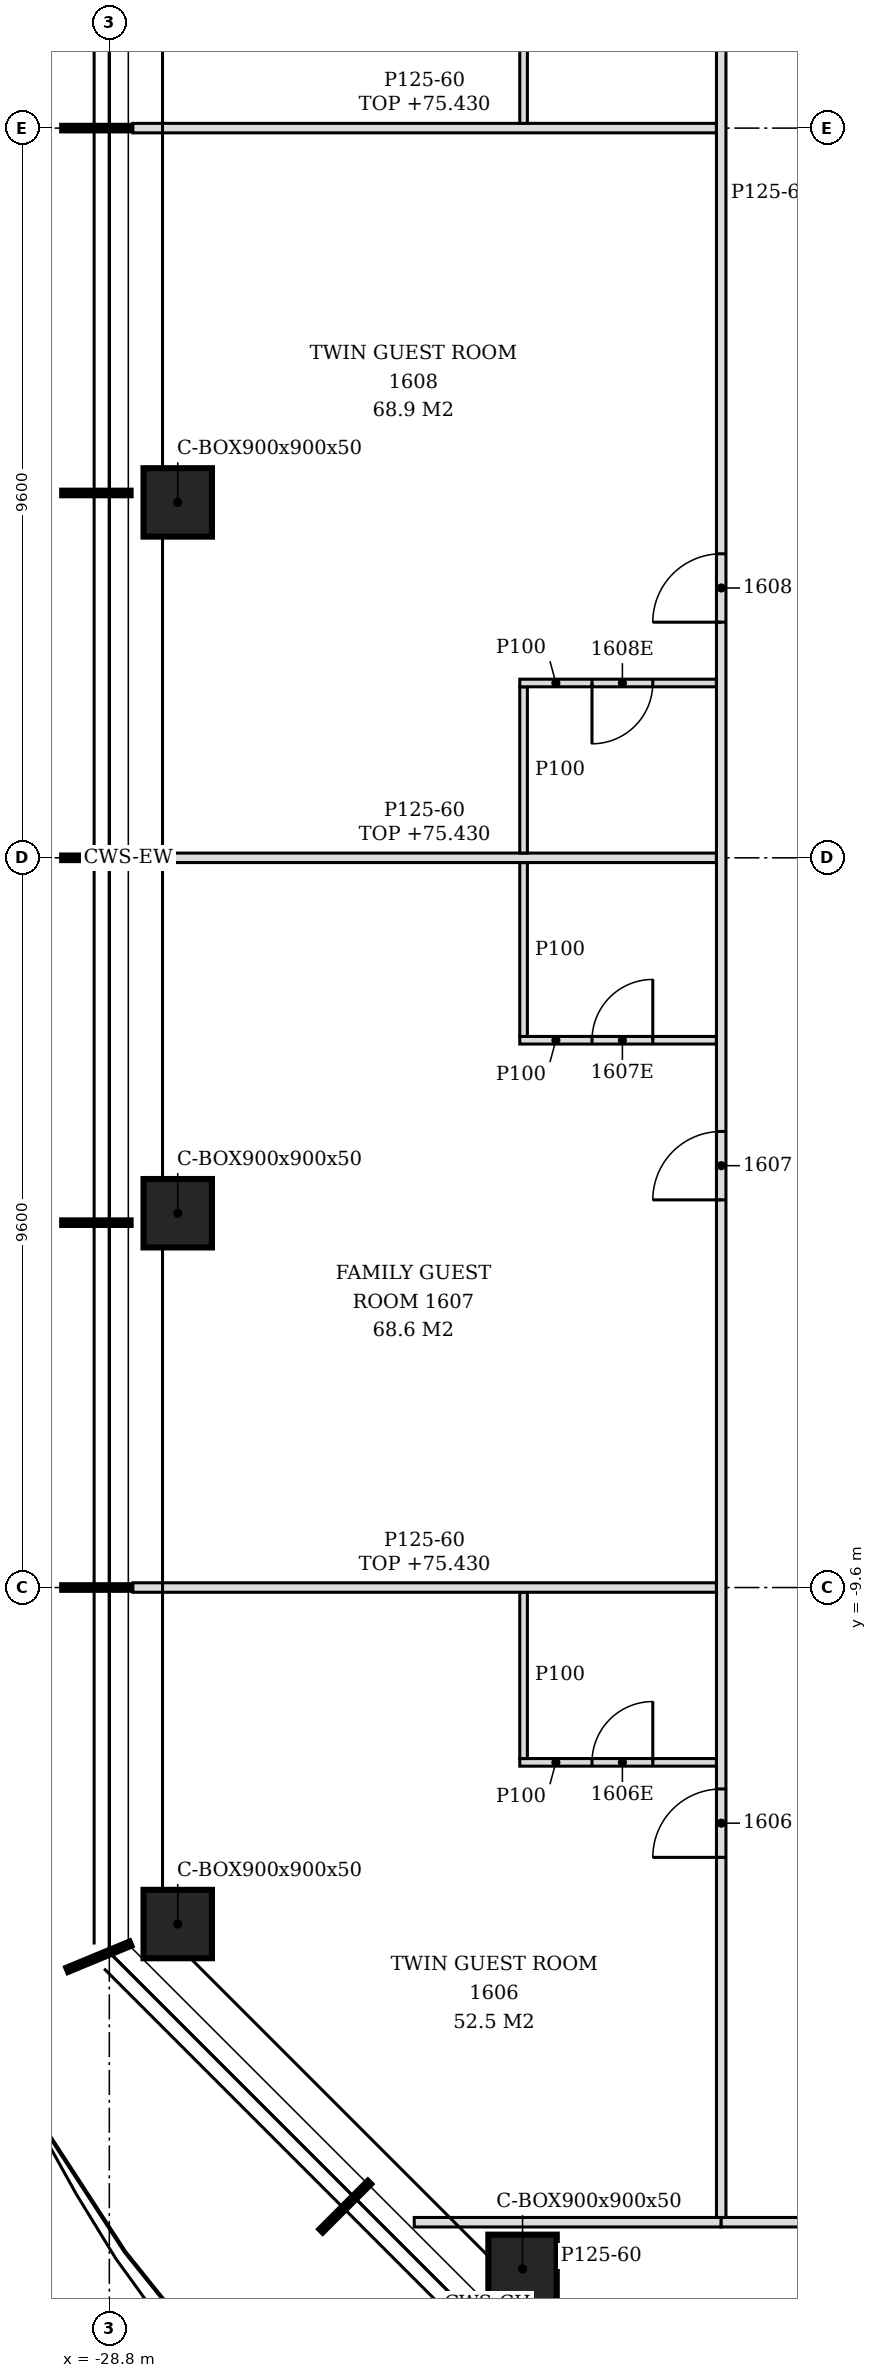
"""IFC4 building model, lengths in metres.
Left out: names, types, materials, properties, quantities, classifications, styles, units other than length and angle.
Written with IfcOpenShell. Run it as: python <this file> out.ifc"""

import sys

from ifc_helpers import new_model, si_unit, direction, frame, frame_2d, origin, origin_2d, place, context, subcontext, project, spatial, polyline, rectangle, hollow_rectangle, outline, extrude, element, fill, save


model = new_model("IFC4")
c1 = context("Model", 3, precision=1e-05, world=origin(), true_north=direction((0.0, 1.0)))
c2 = subcontext(c1, "Body", "Model", "MODEL_VIEW")
j1 = project(units=[si_unit("LENGTHUNIT", "METRE"), si_unit("PLANEANGLEUNIT", "RADIAN")], contexts=[c1])
p1 = place(None, origin())
s1 = spatial("IfcSite", under=j1, at=p1, CompositionType="ELEMENT")
p2 = place(p1, origin())
s2 = spatial("IfcBuilding", under=s1, at=p2, CompositionType="ELEMENT")
p3 = place(p2, frame((0.0, 0.0, 72.6)))
s3 = spatial("IfcBuildingStorey", under=s2, at=p3, CompositionType="ELEMENT", Elevation=72.6)
for number, where, z_axis, x_axis in (
    (1, (-27.9, 4.676, -0.15), (0.0, 0.0, 1.0), (1.0, 0.0, 0.0)),
    (2, (-27.9, -4.676, -0.15), (0.0, 0.0, 1.0), (1.0, 0.0, 0.0)),
    (3, (-27.9, -14.027, -0.15), (0.0, 0.0, 1.0), (1.0, 0.0, 0.0)),
    (4, (-23.364, -18.564, -0.15), (0.0, 0.0, 1.0), (1.0, 0.0, 0.0)),
):
    element("IfcColumn", number, at=place(p3, frame(where, z_axis=z_axis, x_axis=x_axis)), inside=s3, PredefinedType="COLUMN", context=c2, shape_type="SweptSolid", body=[
        extrude(hollow_rectangle(XDim=0.9, YDim=0.9, WallThickness=0.05, at=origin_2d()), origin(), (0.0, 0.0, 1.0), 3.6),
    ])
p4 = place(p3, frame((-24.789, -17.95, 0.0), z_axis=(0.0, 0.0, 1.0), x_axis=(1.0, 0.0, 0.0)))
e5 = element("IfcWall", 5, at=p4, inside=s3, PredefinedType="PARTITIONING", context=c2, shape_type="SweptSolid", body=[
    extrude(outline(polyline([(0.0, 0.0), (4.039, 0.0), (4.039, 3.45), (1.086, 3.45), (1.084, 2.93), (0.537, 2.93), (0.535, 3.45), (0.0, 3.45), (0.0, 0.0)])), frame((0.0, 0.062, 0.0), z_axis=(0.0, -1.0, 0.0), x_axis=(1.0, 0.0, 0.0)), (0.0, 0.0, 1.0), 0.125),
])
p5 = place(p3, frame((-20.75, -17.95, 0.0), z_axis=(0.0, 0.0, 1.0), x_axis=(1.0, 0.0, 0.0)))
e6 = element("IfcWall", 6, at=p5, inside=s3, PredefinedType="PARTITIONING", context=c2, shape_type="SweptSolid", body=[
    extrude(outline(polyline([(0.0, 0.0), (39.887, 0.0), (39.887, 2.73), (39.8, 2.73), (39.798, 3.45), (28.1, 3.45), (28.098, 2.73), (27.8, 2.73), (27.798, 3.45), (16.1, 3.45), (16.098, 2.73), (15.8, 2.73), (15.798, 3.45), (6.5, 3.45), (6.498, 2.93), (6.2, 2.93), (6.198, 3.45), (0.0, 3.45), (0.0, 0.0)])), frame((0.0, 0.062, 0.0), z_axis=(0.0, -1.0, 0.0), x_axis=(1.0, 0.0, 0.0)), (0.0, 0.0, 1.0), 0.125),
])
p6 = place(p5, frame((5.15, 0.0, 0.0)))
e7 = element("IfcOpeningElement", 7, at=p6, cuts=e6, PredefinedType="OPENING", context=c2, shape_type="SweptSolid", body=[
    extrude(rectangle(XDim=0.9, YDim=2.1, at=frame_2d((0.45, 1.05))), frame((0.0, 0.073, 0.0), z_axis=(0.0, -1.0, 0.0), x_axis=(1.0, 0.0, 0.0)), (0.0, 0.0, 1.0), 0.145),
])
p7 = place(p5, frame((14.75, 0.0, 0.0)))
e8 = element("IfcOpeningElement", 8, at=p7, cuts=e6, PredefinedType="OPENING", context=c2, shape_type="SweptSolid", body=[
    extrude(rectangle(XDim=0.9, YDim=2.1, at=frame_2d((0.45, 1.05))), frame((0.0, 0.073, 0.0), z_axis=(0.0, -1.0, 0.0), x_axis=(1.0, 0.0, 0.0)), (0.0, 0.0, 1.0), 0.145),
])
p8 = place(p5, frame((24.35, 0.0, 0.0)))
e9 = element("IfcOpeningElement", 9, at=p8, cuts=e6, PredefinedType="OPENING", context=c2, shape_type="SweptSolid", body=[
    extrude(rectangle(XDim=0.9, YDim=2.1, at=frame_2d((0.45, 1.05))), frame((0.0, 0.073, 0.0), z_axis=(0.0, -1.0, 0.0), x_axis=(1.0, 0.0, 0.0)), (0.0, 0.0, 1.0), 0.145),
])
p9 = place(p5, frame((29.75, 0.0, 0.0)))
e10 = element("IfcOpeningElement", 10, at=p9, cuts=e6, PredefinedType="OPENING", context=c2, shape_type="SweptSolid", body=[
    extrude(rectangle(XDim=0.9, YDim=2.1, at=frame_2d((0.45, 1.05))), frame((0.0, 0.073, 0.0), z_axis=(0.0, -1.0, 0.0), x_axis=(1.0, 0.0, 0.0)), (0.0, 0.0, 1.0), 0.145),
])
p10 = place(p5, frame((35.45, 0.0, 0.0)))
e11 = element("IfcOpeningElement", 11, at=p10, cuts=e6, PredefinedType="OPENING", context=c2, shape_type="SweptSolid", body=[
    extrude(rectangle(XDim=0.9, YDim=2.1, at=frame_2d((0.45, 1.05))), frame((0.0, 0.073, 0.0), z_axis=(0.0, -1.0, 0.0), x_axis=(1.0, 0.0, 0.0)), (0.0, 0.0, 1.0), 0.145),
])
p11 = place(p3, frame((-20.75, -17.887, 0.0), z_axis=(0.0, 0.0, 1.0), x_axis=(0.0, 1.0, 0.0)))
e12 = element("IfcWall", 12, at=p11, inside=s3, PredefinedType="PARTITIONING", context=c2, shape_type="SweptSolid", body=[
    extrude(outline(polyline([(0.0, 0.0), (39.876, 0.0), (39.876, 3.45), (39.622, 3.45), (39.62, 2.63), (38.507, 2.63), (38.505, 3.45), (37.183, 3.45), (37.18, 2.98), (36.992, 2.98), (36.99, 3.45), (32.397, 3.45), (32.396, 2.83), (32.177, 2.83), (32.176, 3.45), (27.597, 3.45), (27.595, 2.83), (27.377, 2.83), (27.375, 3.45), (22.798, 3.45), (22.795, 2.83), (22.577, 2.83), (22.575, 3.45), (17.998, 3.45), (17.996, 2.83), (17.778, 2.83), (17.775, 3.45), (13.198, 3.45), (13.196, 2.83), (12.978, 2.83), (12.976, 3.45), (8.397, 3.45), (8.396, 2.83), (8.177, 2.83), (8.176, 3.45), (3.597, 3.45), (3.595, 2.83), (3.377, 2.83), (3.375, 3.45), (0.0, 3.45), (0.0, 0.0)])), frame((0.0, 0.062, 0.0), z_axis=(0.0, -1.0, 0.0), x_axis=(1.0, 0.0, 0.0)), (0.0, 0.0, 1.0), 0.125),
])
p12 = place(p11, frame((4.738, 0.0, 0.0)))
e13 = element("IfcOpeningElement", 13, at=p12, cuts=e12, PredefinedType="OPENING", context=c2, shape_type="SweptSolid", body=[
    extrude(rectangle(XDim=0.9, YDim=2.1, at=frame_2d((0.45, 1.05))), frame((0.0, 0.073, 0.0), z_axis=(0.0, -1.0, 0.0), x_axis=(1.0, 0.0, 0.0)), (0.0, 0.0, 1.0), 0.145),
])
p13 = place(p11, frame((13.387, 0.0, 0.0)))
e14 = element("IfcOpeningElement", 14, at=p13, cuts=e12, PredefinedType="OPENING", context=c2, shape_type="SweptSolid", body=[
    extrude(rectangle(XDim=0.9, YDim=2.1, at=frame_2d((0.45, 1.05))), frame((0.0, 0.073, 0.0), z_axis=(0.0, -1.0, 0.0), x_axis=(1.0, 0.0, 0.0)), (0.0, 0.0, 1.0), 0.145),
])
p14 = place(p11, frame((20.988, 0.0, 0.0)))
e15 = element("IfcOpeningElement", 15, at=p14, cuts=e12, PredefinedType="OPENING", context=c2, shape_type="SweptSolid", body=[
    extrude(rectangle(XDim=0.9, YDim=2.1, at=frame_2d((0.45, 1.05))), frame((0.0, 0.073, 0.0), z_axis=(0.0, -1.0, 0.0), x_axis=(1.0, 0.0, 0.0)), (0.0, 0.0, 1.0), 0.145),
])
p15 = place(p11, frame((31.387, 0.0, 0.0)))
e16 = element("IfcOpeningElement", 16, at=p15, cuts=e12, PredefinedType="OPENING", context=c2, shape_type="SweptSolid", body=[
    extrude(rectangle(XDim=0.9, YDim=2.1, at=frame_2d((0.45, 1.05))), frame((0.0, 0.073, 0.0), z_axis=(0.0, -1.0, 0.0), x_axis=(1.0, 0.0, 0.0)), (0.0, 0.0, 1.0), 0.145),
])
p16 = place(p3, frame((-23.4, -11.9, 0.0), z_axis=(0.0, 0.0, 1.0), x_axis=(1.0, 0.0, 0.0)))
e17 = element("IfcWall", 17, at=p16, inside=s3, PredefinedType="PARTITIONING", context=c2, shape_type="SweptSolid", body=[
    extrude(rectangle(XDim=2.587, YDim=0.1, at=frame_2d((1.294, 0.0))), origin(), (0.0, 0.0, 1.0), 3.45),
])
p17 = place(p16, frame((0.95, 0.0, 0.0)))
e18 = element("IfcOpeningElement", 18, at=p17, cuts=e17, PredefinedType="OPENING", context=c2, shape_type="SweptSolid", body=[
    extrude(rectangle(XDim=0.8, YDim=2.1, at=frame_2d((0.4, 1.05))), frame((0.0, 0.06, 0.0), z_axis=(0.0, -1.0, 0.0), x_axis=(1.0, 0.0, 0.0)), (0.0, 0.0, 1.0), 0.12),
])
p18 = place(p3, frame((-23.35, -11.85, 0.0), z_axis=(0.0, 0.0, 1.0), x_axis=(0.0, 1.0, 0.0)))
e19 = element("IfcWall", 19, at=p18, inside=s3, PredefinedType="PARTITIONING", context=c2, shape_type="SweptSolid", body=[
    extrude(outline(polyline([(0.0, 0.0), (2.188, 0.0), (2.188, 2.83), (2.14, 2.83), (2.138, 3.45), (0.0, 3.45), (0.0, 0.0)])), frame((0.0, 0.05, 0.0), z_axis=(0.0, -1.0, 0.0), x_axis=(1.0, 0.0, 0.0)), (0.0, 0.0, 1.0), 0.1),
])
p19 = place(p3, frame((-28.49, -9.6, 0.0), z_axis=(0.0, 0.0, 1.0), x_axis=(1.0, 0.0, 0.0)))
e20 = element("IfcWall", 20, at=p19, inside=s3, PredefinedType="PARTITIONING", context=c2, shape_type="SweptSolid", body=[
    extrude(rectangle(XDim=7.677, YDim=0.125, at=frame_2d((3.839, 0.0))), origin(), (0.0, 0.0, 1.0), 2.83),
])
p20 = place(p3, frame((-23.4, -2.4, 0.0), z_axis=(0.0, 0.0, 1.0), x_axis=(1.0, 0.0, 0.0)))
e21 = element("IfcWall", 21, at=p20, inside=s3, PredefinedType="PARTITIONING", context=c2, shape_type="SweptSolid", body=[
    extrude(rectangle(XDim=2.587, YDim=0.1, at=frame_2d((1.294, 0.0))), origin(), (0.0, 0.0, 1.0), 3.45),
])
p21 = place(p20, frame((0.95, 0.0, 0.0)))
e22 = element("IfcOpeningElement", 22, at=p21, cuts=e21, PredefinedType="OPENING", context=c2, shape_type="SweptSolid", body=[
    extrude(rectangle(XDim=0.8, YDim=2.1, at=frame_2d((0.4, 1.05))), frame((0.0, 0.06, 0.0), z_axis=(0.0, -1.0, 0.0), x_axis=(1.0, 0.0, 0.0)), (0.0, 0.0, 1.0), 0.12),
])
p22 = place(p3, frame((-23.35, -2.35, 0.0), z_axis=(0.0, 0.0, 1.0), x_axis=(0.0, 1.0, 0.0)))
e23 = element("IfcWall", 23, at=p22, inside=s3, PredefinedType="PARTITIONING", context=c2, shape_type="SweptSolid", body=[
    extrude(outline(polyline([(0.0, 0.0), (2.288, 0.0), (2.288, 2.83), (2.24, 2.83), (2.238, 3.45), (0.0, 3.45), (0.0, 0.0)])), frame((0.0, 0.05, 0.0), z_axis=(0.0, -1.0, 0.0), x_axis=(1.0, 0.0, 0.0)), (0.0, 0.0, 1.0), 0.1),
])
p23 = place(p3, frame((-28.49, 0.0, 0.0), z_axis=(0.0, 0.0, 1.0), x_axis=(1.0, 0.0, 0.0)))
e24 = element("IfcWall", 24, at=p23, inside=s3, PredefinedType="PARTITIONING", context=c2, shape_type="SweptSolid", body=[
    extrude(rectangle(XDim=7.677, YDim=0.125, at=frame_2d((3.839, 0.0))), origin(), (0.0, 0.0, 1.0), 2.83),
])
p24 = place(p3, frame((-23.35, 0.062, 0.0), z_axis=(0.0, 0.0, 1.0), x_axis=(0.0, 1.0, 0.0)))
e25 = element("IfcWall", 25, at=p24, inside=s3, PredefinedType="PARTITIONING", context=c2, shape_type="SweptSolid", body=[
    extrude(outline(polyline([(0.0, 0.0), (2.188, 0.0), (2.188, 3.45), (0.048, 3.45), (0.045, 2.83), (0.0, 2.83), (0.0, 0.0)])), frame((0.0, 0.05, 0.0), z_axis=(0.0, -1.0, 0.0), x_axis=(1.0, 0.0, 0.0)), (0.0, 0.0, 1.0), 0.1),
])
p25 = place(p3, frame((-23.4, 2.3, 0.0), z_axis=(0.0, 0.0, 1.0), x_axis=(1.0, 0.0, 0.0)))
e26 = element("IfcWall", 26, at=p25, inside=s3, PredefinedType="PARTITIONING", context=c2, shape_type="SweptSolid", body=[
    extrude(rectangle(XDim=2.587, YDim=0.1, at=frame_2d((1.294, 0.0))), origin(), (0.0, 0.0, 1.0), 3.45),
])
p26 = place(p25, frame((0.95, 0.0, 0.0)))
e27 = element("IfcOpeningElement", 27, at=p26, cuts=e26, PredefinedType="OPENING", context=c2, shape_type="SweptSolid", body=[
    extrude(rectangle(XDim=0.8, YDim=2.1, at=frame_2d((0.4, 1.05))), frame((0.0, 0.06, 0.0), z_axis=(0.0, -1.0, 0.0), x_axis=(1.0, 0.0, 0.0)), (0.0, 0.0, 1.0), 0.12),
])
p27 = place(p3, frame((-28.49, 9.6, 0.0), z_axis=(0.0, 0.0, 1.0), x_axis=(1.0, 0.0, 0.0)))
e28 = element("IfcWall", 28, at=p27, inside=s3, PredefinedType="PARTITIONING", context=c2, shape_type="SweptSolid", body=[
    extrude(rectangle(XDim=7.677, YDim=0.125, at=frame_2d((3.839, 0.0))), origin(), (0.0, 0.0, 1.0), 2.83),
])
p28 = place(p3, frame((-23.35, 9.663, 0.0), z_axis=(0.0, 0.0, 1.0), x_axis=(0.0, 1.0, 0.0)))
e29 = element("IfcWall", 29, at=p28, inside=s3, PredefinedType="PARTITIONING", context=c2, shape_type="SweptSolid", body=[
    extrude(outline(polyline([(0.0, 0.0), (2.287, 0.0), (2.288, 3.45), (0.048, 3.45), (0.045, 2.83), (0.0, 2.83), (0.0, 0.0)])), frame((0.0, 0.05, 0.0), z_axis=(0.0, -1.0, 0.0), x_axis=(1.0, 0.0, 0.0)), (0.0, 0.0, 1.0), 0.1),
])
p29 = place(p12, origin())
e30 = element("IfcDoor", 30, at=p29, inside=s3, OperationType="SINGLE_SWING_LEFT", PredefinedType="DOOR", context=c2, shape_type="SweptSolid", body=[
    extrude(rectangle(XDim=0.9, YDim=2.1, at=frame_2d((0.45, 1.05))), frame((0.0, 0.025, 0.0), z_axis=(0.0, -1.0, 0.0), x_axis=(1.0, 0.0, 0.0)), (0.0, 0.0, 1.0), 0.05),
])
fill(e13, e30)
p30 = place(p17, origin())
e31 = element("IfcDoor", 31, at=p30, inside=s3, OperationType="SINGLE_SWING_RIGHT", PredefinedType="DOOR", context=c2, shape_type="SweptSolid", body=[
    extrude(rectangle(XDim=0.8, YDim=2.1, at=frame_2d((0.4, 1.05))), frame((0.0, 0.025, 0.0), z_axis=(0.0, -1.0, 0.0), x_axis=(1.0, 0.0, 0.0)), (0.0, 0.0, 1.0), 0.05),
])
fill(e18, e31)
p31 = place(p13, origin())
e32 = element("IfcDoor", 32, at=p31, inside=s3, OperationType="SINGLE_SWING_LEFT", PredefinedType="DOOR", context=c2, shape_type="SweptSolid", body=[
    extrude(rectangle(XDim=0.9, YDim=2.1, at=frame_2d((0.45, 1.05))), frame((0.0, 0.025, 0.0), z_axis=(0.0, -1.0, 0.0), x_axis=(1.0, 0.0, 0.0)), (0.0, 0.0, 1.0), 0.05),
])
fill(e14, e32)
p32 = place(p21, origin())
e33 = element("IfcDoor", 33, at=p32, inside=s3, OperationType="SINGLE_SWING_RIGHT", PredefinedType="DOOR", context=c2, shape_type="SweptSolid", body=[
    extrude(rectangle(XDim=0.8, YDim=2.1, at=frame_2d((0.4, 1.05))), frame((0.0, 0.025, 0.0), z_axis=(0.0, -1.0, 0.0), x_axis=(1.0, 0.0, 0.0)), (0.0, 0.0, 1.0), 0.05),
])
fill(e22, e33)
p33 = place(p14, origin())
e34 = element("IfcDoor", 34, at=p33, inside=s3, OperationType="SINGLE_SWING_LEFT", PredefinedType="DOOR", context=c2, shape_type="SweptSolid", body=[
    extrude(rectangle(XDim=0.9, YDim=2.1, at=frame_2d((0.45, 1.05))), frame((0.0, 0.025, 0.0), z_axis=(0.0, -1.0, 0.0), x_axis=(1.0, 0.0, 0.0)), (0.0, 0.0, 1.0), 0.05),
])
fill(e15, e34)
p34 = place(p26, frame((0.8, 0.0, 0.0), z_axis=(0.0, 0.0, 1.0), x_axis=(-1.0, 0.0, 0.0)))
e35 = element("IfcDoor", 35, at=p34, inside=s3, OperationType="SINGLE_SWING_RIGHT", PredefinedType="DOOR", context=c2, shape_type="SweptSolid", body=[
    extrude(rectangle(XDim=0.8, YDim=2.1, at=frame_2d((0.4, 1.05))), frame((0.0, 0.025, 0.0), z_axis=(0.0, -1.0, 0.0), x_axis=(1.0, 0.0, 0.0)), (0.0, 0.0, 1.0), 0.05),
])
fill(e27, e35)
save(model, sys.argv[1])
